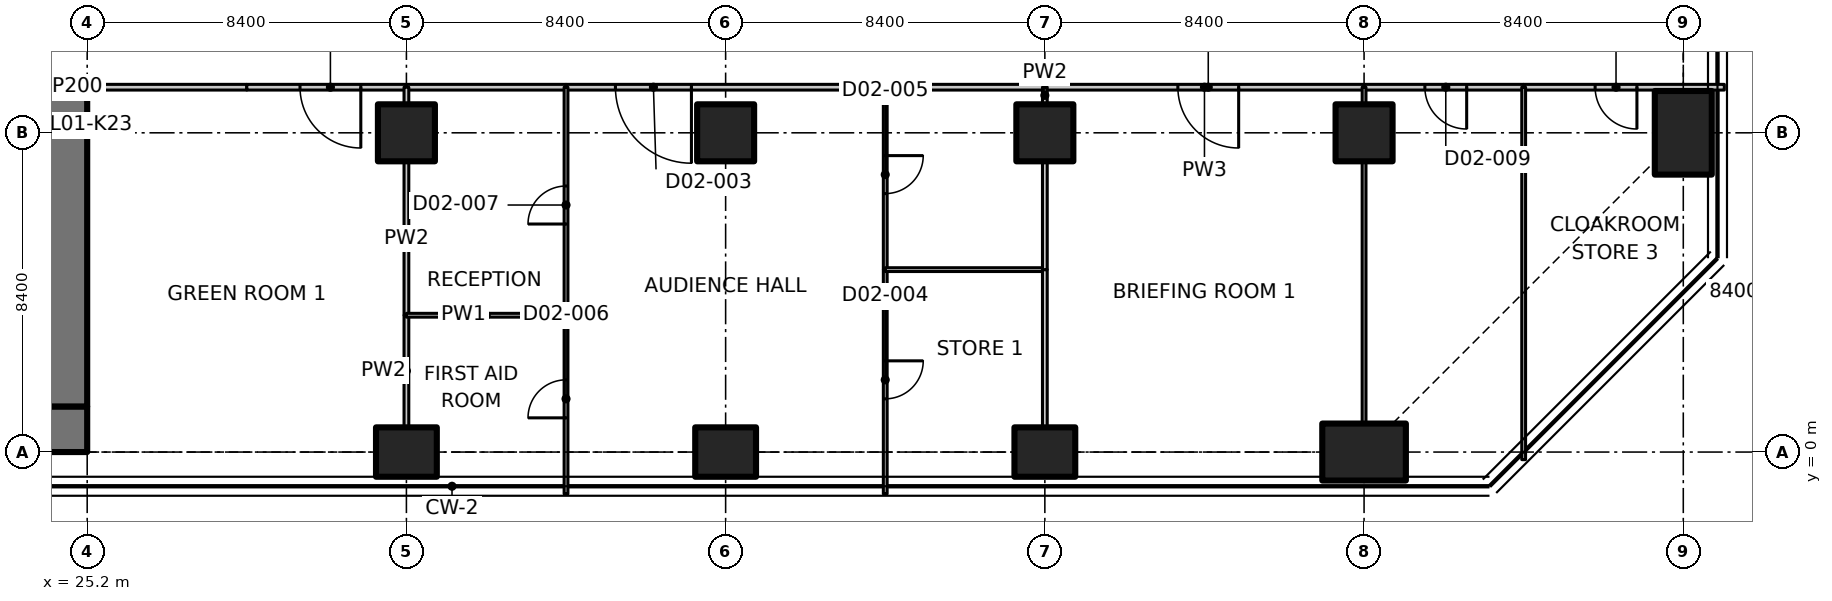
"""IFC4 building model, lengths in metres.
Left out: names, types, materials, properties, quantities, classifications, styles, units other than length and angle.
Written with IfcOpenShell. Run it as: python <this file> out.ifc"""

import sys

from ifc_helpers import new_model, si_unit, direction, frame, frame_2d, origin, origin_2d, place, context, subcontext, project, spatial, polyline, rectangle, outline, extrude, element, fill, save


model = new_model("IFC4")
c1 = context("Model", 3, precision=1e-05, world=origin(), true_north=direction((0.0, 1.0)))
c2 = subcontext(c1, "Body", "Model", "MODEL_VIEW")
j1 = project(units=[si_unit("LENGTHUNIT", "METRE"), si_unit("PLANEANGLEUNIT", "RADIAN")], contexts=[c1])
p1 = place(None, origin())
s1 = spatial("IfcSite", under=j1, at=p1, CompositionType="ELEMENT")
p2 = place(p1, origin())
s2 = spatial("IfcBuilding", under=s1, at=p2, CompositionType="ELEMENT")
p3 = place(p2, frame((0.0, 0.0, 7.0)))
s3 = spatial("IfcBuildingStorey", under=s2, at=p3, CompositionType="ELEMENT", Elevation=7.0)
p4 = place(p3, frame((33.6, 0.0, 0.0), z_axis=(0.0, 0.0, 1.0), x_axis=(0.0, 1.0, 0.0)))
e1 = element("IfcColumn", 1, at=p4, inside=s3, PredefinedType="COLUMN", context=c2, shape_type="SweptSolid", body=[
    extrude(rectangle(XDim=1.3, YDim=1.6, at=origin_2d()), origin(), (0.0, 0.0, 1.0), 5.25),
])
p5 = place(p3, frame((33.6, 8.4, 0.0), z_axis=(0.0, 0.0, 1.0), x_axis=(1.0, 0.0, 0.0)))
e2 = element("IfcColumn", 2, at=p5, inside=s3, PredefinedType="COLUMN", context=c2, shape_type="SweptSolid", body=[
    extrude(rectangle(XDim=1.5, YDim=1.5, at=origin_2d()), origin(), (0.0, 0.0, 1.0), 5.25),
])
p6 = place(p3, frame((42.0, 0.0, 0.0), z_axis=(0.0, 0.0, 1.0), x_axis=(0.0, 1.0, 0.0)))
e3 = element("IfcColumn", 3, at=p6, inside=s3, PredefinedType="COLUMN", context=c2, shape_type="SweptSolid", body=[
    extrude(rectangle(XDim=1.3, YDim=1.6, at=origin_2d()), origin(), (0.0, 0.0, 1.0), 5.25),
])
p7 = place(p3, frame((42.0, 8.4, 0.0), z_axis=(0.0, 0.0, 1.0), x_axis=(1.0, 0.0, 0.0)))
e4 = element("IfcColumn", 4, at=p7, inside=s3, PredefinedType="COLUMN", context=c2, shape_type="SweptSolid", body=[
    extrude(rectangle(XDim=1.5, YDim=1.5, at=origin_2d()), origin(), (0.0, 0.0, 1.0), 5.25),
])
p8 = place(p3, frame((50.4, 0.0, 0.0), z_axis=(0.0, 0.0, 1.0), x_axis=(0.0, 1.0, 0.0)))
e5 = element("IfcColumn", 5, at=p8, inside=s3, PredefinedType="COLUMN", context=c2, shape_type="SweptSolid", body=[
    extrude(rectangle(XDim=1.3, YDim=1.6, at=origin_2d()), origin(), (0.0, 0.0, 1.0), 5.25),
])
p9 = place(p3, frame((50.4, 8.4, 0.0), z_axis=(0.0, 0.0, 1.0), x_axis=(1.0, 0.0, 0.0)))
e6 = element("IfcColumn", 6, at=p9, inside=s3, PredefinedType="COLUMN", context=c2, shape_type="SweptSolid", body=[
    extrude(rectangle(XDim=1.5, YDim=1.5, at=origin_2d()), origin(), (0.0, 0.0, 1.0), 5.25),
])
p10 = place(p3, frame((58.8, 0.0, 0.0), z_axis=(0.0, 0.0, 1.0), x_axis=(0.0, 1.0, 0.0)))
e7 = element("IfcColumn", 7, at=p10, inside=s3, PredefinedType="COLUMN", context=c2, shape_type="SweptSolid", body=[
    extrude(rectangle(XDim=1.5, YDim=2.2, at=origin_2d()), origin(), (0.0, 0.0, 1.0), 5.25),
])
p11 = place(p3, frame((58.8, 8.4, 0.0), z_axis=(0.0, 0.0, 1.0), x_axis=(1.0, 0.0, 0.0)))
e8 = element("IfcColumn", 8, at=p11, inside=s3, PredefinedType="COLUMN", context=c2, shape_type="SweptSolid", body=[
    extrude(rectangle(XDim=1.5, YDim=1.5, at=origin_2d()), origin(), (0.0, 0.0, 1.0), 5.25),
])
p12 = place(p3, frame((67.2, 8.4, 0.0), z_axis=(0.0, 0.0, 1.0), x_axis=(1.0, 0.0, 0.0)))
e9 = element("IfcColumn", 9, at=p12, inside=s3, PredefinedType="COLUMN", context=c2, shape_type="SweptSolid", body=[
    extrude(rectangle(XDim=1.5, YDim=2.2, at=origin_2d()), origin(), (0.0, 0.0, 1.0), 5.25),
])
p13 = place(p3, frame((6.736, 0.6, 0.0), z_axis=(0.0, 0.0, 1.0), x_axis=(1.0, 0.0, 0.0)))
e10 = element("IfcWall", 10, at=p13, inside=s3, PredefinedType="SHEAR", context=c2, shape_type="SweptSolid", body=[
    extrude(rectangle(XDim=18.464, YDim=1.2, at=frame_2d((9.232, 0.0))), origin(), (0.0, 0.0, 1.0), 5.25),
])
p14 = place(p3, frame((24.6, 1.2, 0.0), z_axis=(0.0, 0.0, 1.0), x_axis=(0.0, 1.0, 0.0)))
e11 = element("IfcWall", 11, at=p14, inside=s3, PredefinedType="SHEAR", context=c2, shape_type="SweptSolid", body=[
    extrude(rectangle(XDim=8.6, YDim=1.2, at=frame_2d((4.3, 0.0))), origin(), (0.0, 0.0, 1.0), 5.25),
])
p15 = place(p3, frame((29.4, 9.6, 0.0), z_axis=(0.0, 0.0, 1.0), x_axis=(-1.0, 0.0, 0.0)))
e12 = element("IfcWall", 12, at=p15, inside=s3, PredefinedType="PARTITIONING", context=c2, shape_type="SweptSolid", body=[
    extrude(rectangle(XDim=4.2, YDim=0.15, at=frame_2d((2.1, 0.0))), origin(), (0.0, 0.0, 1.0), 5.23),
])
p16 = place(p3, frame((33.6, 9.6, 0.0), z_axis=(0.0, 0.0, 1.0), x_axis=(-1.0, 0.0, 0.0)))
e13 = element("IfcWall", 13, at=p16, inside=s3, PredefinedType="PARTITIONING", context=c2, shape_type="SweptSolid", body=[
    extrude(rectangle(XDim=4.2, YDim=0.15, at=frame_2d((2.1, 0.0))), origin(), (0.0, 0.0, 1.0), 5.23),
])
p17 = place(p16, frame((1.2, 0.0, 0.0)))
e14 = element("IfcOpeningElement", 14, at=p17, cuts=e13, PredefinedType="OPENING", context=c2, shape_type="SweptSolid", body=[
    extrude(rectangle(XDim=1.6, YDim=2.1, at=frame_2d((0.8, 1.05))), frame((0.0, 0.085, 0.0), z_axis=(0.0, -1.0, 0.0), x_axis=(1.0, 0.0, 0.0)), (0.0, 0.0, 1.0), 0.17),
])
p18 = place(p3, frame((46.2, 9.6, 0.0), z_axis=(0.0, 0.0, 1.0), x_axis=(-1.0, 0.0, 0.0)))
e15 = element("IfcWall", 15, at=p18, inside=s3, PredefinedType="PARTITIONING", context=c2, shape_type="SweptSolid", body=[
    extrude(rectangle(XDim=8.4, YDim=0.15, at=frame_2d((4.2, 0.0))), origin(), (0.0, 0.0, 1.0), 5.23),
])
p19 = place(p18, frame((5.1, 0.0, 0.0)))
e16 = element("IfcOpeningElement", 16, at=p19, cuts=e15, PredefinedType="OPENING", context=c2, shape_type="SweptSolid", body=[
    extrude(rectangle(XDim=2.0, YDim=2.4, at=frame_2d((1.0, 1.2))), frame((0.0, 0.085, 0.0), z_axis=(0.0, -1.0, 0.0), x_axis=(1.0, 0.0, 0.0)), (0.0, 0.0, 1.0), 0.17),
])
for number, where, z_axis, x_axis in (
    (17, (50.4, 9.6, 0.0), (0.0, 0.0, 1.0), (-1.0, 0.0, 0.0)),
    (18, (37.8, 9.6, 0.0), (0.0, 0.0, 1.0), (-1.0, 0.0, 0.0)),
):
    element("IfcWall", number, at=place(p3, frame(where, z_axis=z_axis, x_axis=x_axis)), inside=s3, PredefinedType="PARTITIONING", context=c2, shape_type="SweptSolid", body=[
        extrude(rectangle(XDim=4.2, YDim=0.15, at=frame_2d((2.1, 0.0))), origin(), (0.0, 0.0, 1.0), 5.23),
    ])
p20 = place(p3, frame((58.8, 9.6, 0.0), z_axis=(0.0, 0.0, 1.0), x_axis=(-1.0, 0.0, 0.0)))
e19 = element("IfcWall", 19, at=p20, inside=s3, PredefinedType="PARTITIONING", context=c2, shape_type="SweptSolid", body=[
    extrude(rectangle(XDim=8.4, YDim=0.15, at=frame_2d((4.2, 0.0))), origin(), (0.0, 0.0, 1.0), 5.23),
])
p21 = place(p20, frame((3.3, 0.0, 0.0)))
e20 = element("IfcOpeningElement", 20, at=p21, cuts=e19, PredefinedType="OPENING", context=c2, shape_type="SweptSolid", body=[
    extrude(rectangle(XDim=1.6, YDim=2.1, at=frame_2d((0.8, 1.05))), frame((0.0, 0.085, 0.0), z_axis=(0.0, -1.0, 0.0), x_axis=(1.0, 0.0, 0.0)), (0.0, 0.0, 1.0), 0.17),
])
p22 = place(p3, frame((63.0, 9.6, 0.0), z_axis=(0.0, 0.0, 1.0), x_axis=(-1.0, 0.0, 0.0)))
e21 = element("IfcWall", 21, at=p22, inside=s3, PredefinedType="PARTITIONING", context=c2, shape_type="SweptSolid", body=[
    extrude(rectangle(XDim=4.2, YDim=0.15, at=frame_2d((2.1, 0.0))), origin(), (0.0, 0.0, 1.0), 5.23),
])
p23 = place(p22, frame((1.5, 0.0, 0.0)))
e22 = element("IfcOpeningElement", 22, at=p23, cuts=e21, PredefinedType="OPENING", context=c2, shape_type="SweptSolid", body=[
    extrude(rectangle(XDim=1.1, YDim=2.1, at=frame_2d((0.55, 1.05))), frame((0.0, 0.085, 0.0), z_axis=(0.0, -1.0, 0.0), x_axis=(1.0, 0.0, 0.0)), (0.0, 0.0, 1.0), 0.17),
])
p24 = place(p3, frame((68.28, 9.6, 0.0), z_axis=(0.0, 0.0, 1.0), x_axis=(-1.0, 0.0, 0.0)))
e23 = element("IfcWall", 23, at=p24, inside=s3, PredefinedType="PARTITIONING", context=c2, shape_type="SweptSolid", body=[
    extrude(outline(polyline([(0.0, 0.0), (5.28, 0.0), (5.28, 5.23), (1.53, 5.23), (1.528, 4.88), (0.632, 4.88), (0.63, 5.23), (0.0, 5.23), (0.0, 0.0)])), frame((0.0, 0.075, 0.0), z_axis=(0.0, -1.0, 0.0), x_axis=(1.0, 0.0, 0.0)), (0.0, 0.0, 1.0), 0.15),
])
p25 = place(p24, frame((2.3, 0.0, 0.0)))
e24 = element("IfcOpeningElement", 24, at=p25, cuts=e23, PredefinedType="OPENING", context=c2, shape_type="SweptSolid", body=[
    extrude(rectangle(XDim=1.1, YDim=2.1, at=frame_2d((0.55, 1.05))), frame((0.0, 0.085, 0.0), z_axis=(0.0, -1.0, 0.0), x_axis=(1.0, 0.0, 0.0)), (0.0, 0.0, 1.0), 0.17),
])
p26 = place(p3, frame((33.6, 3.6, 0.0), z_axis=(0.0, 0.0, 1.0), x_axis=(0.0, -1.0, 0.0)))
e25 = element("IfcWall", 25, at=p26, inside=s3, PredefinedType="PARTITIONING", context=c2, shape_type="SweptSolid", body=[
    extrude(rectangle(XDim=2.93, YDim=0.125, at=frame_2d((1.465, 0.0))), origin(), (0.0, 0.0, 1.0), 5.23),
])
p27 = place(p3, frame((33.6, 9.6, 0.0), z_axis=(0.0, 0.0, 1.0), x_axis=(0.0, -1.0, 0.0)))
e26 = element("IfcWall", 26, at=p27, inside=s3, PredefinedType="PARTITIONING", context=c2, shape_type="SweptSolid", body=[
    extrude(rectangle(XDim=0.43, YDim=0.125, at=frame_2d((0.215, 0.0))), origin(), (0.0, 0.0, 1.0), 5.23),
])
p28 = place(p3, frame((33.6, 7.63, 0.0), z_axis=(0.0, 0.0, 1.0), x_axis=(0.0, -1.0, 0.0)))
e27 = element("IfcWall", 27, at=p28, inside=s3, PredefinedType="PARTITIONING", context=c2, shape_type="SweptSolid", body=[
    extrude(rectangle(XDim=4.03, YDim=0.125, at=frame_2d((2.015, 0.0))), origin(), (0.0, 0.0, 1.0), 5.23),
])
p29 = place(p3, frame((46.2, 4.8, 0.0), z_axis=(0.0, 0.0, 1.0), x_axis=(0.0, -1.0, 0.0)))
e28 = element("IfcWall", 28, at=p29, inside=s3, PredefinedType="PARTITIONING", context=c2, shape_type="SweptSolid", body=[
    extrude(outline(polyline([(0.0, 0.0), (5.9, 0.0), (5.9, 5.23), (5.25, 5.23), (5.248, 4.88), (4.352, 4.88), (4.35, 5.23), (0.0, 5.23), (0.0, 0.0)])), frame((0.0, 0.05, 0.0), z_axis=(0.0, -1.0, 0.0), x_axis=(1.0, 0.0, 0.0)), (0.0, 0.0, 1.0), 0.1),
])
p30 = place(p29, frame((2.4, 0.0, 0.0)))
e29 = element("IfcOpeningElement", 29, at=p30, cuts=e28, PredefinedType="OPENING", context=c2, shape_type="SweptSolid", body=[
    extrude(rectangle(XDim=1.0, YDim=2.1, at=frame_2d((0.5, 1.05))), frame((0.0, 0.06, 0.0), z_axis=(0.0, -1.0, 0.0), x_axis=(1.0, 0.0, 0.0)), (0.0, 0.0, 1.0), 0.12),
])
p31 = place(p3, frame((46.2, 9.6, 0.0), z_axis=(0.0, 0.0, 1.0), x_axis=(0.0, -1.0, 0.0)))
e30 = element("IfcWall", 30, at=p31, inside=s3, PredefinedType="PARTITIONING", context=c2, shape_type="SweptSolid", body=[
    extrude(rectangle(XDim=4.8, YDim=0.1, at=frame_2d((2.4, 0.0))), origin(), (0.0, 0.0, 1.0), 5.23),
])
p32 = place(p31, frame((1.8, 0.0, 0.0)))
e31 = element("IfcOpeningElement", 31, at=p32, cuts=e30, PredefinedType="OPENING", context=c2, shape_type="SweptSolid", body=[
    extrude(rectangle(XDim=1.0, YDim=2.1, at=frame_2d((0.5, 1.05))), frame((0.0, 0.06, 0.0), z_axis=(0.0, -1.0, 0.0), x_axis=(1.0, 0.0, 0.0)), (0.0, 0.0, 1.0), 0.12),
])
p33 = place(p3, frame((37.8, -1.1, 0.0), z_axis=(0.0, 0.0, 1.0), x_axis=(0.0, 1.0, 0.0)))
e32 = element("IfcWall", 32, at=p33, inside=s3, PredefinedType="PARTITIONING", context=c2, shape_type="SweptSolid", body=[
    extrude(outline(polyline([(0.0, 0.0), (4.7, 0.0), (4.7, 5.23), (1.55, 5.23), (1.548, 4.88), (0.652, 4.88), (0.65, 5.23), (0.0, 5.23), (0.0, 0.0)])), frame((0.0, 0.05, 0.0), z_axis=(0.0, -1.0, 0.0), x_axis=(1.0, 0.0, 0.0)), (0.0, 0.0, 1.0), 0.1),
])
p34 = place(p33, frame((2.0, 0.0, 0.0)))
e33 = element("IfcOpeningElement", 33, at=p34, cuts=e32, PredefinedType="OPENING", context=c2, shape_type="SweptSolid", body=[
    extrude(rectangle(XDim=1.0, YDim=2.1, at=frame_2d((0.5, 1.05))), frame((0.0, 0.06, 0.0), z_axis=(0.0, -1.0, 0.0), x_axis=(1.0, 0.0, 0.0)), (0.0, 0.0, 1.0), 0.12),
])
p35 = place(p3, frame((37.8, 3.6, 0.0), z_axis=(0.0, 0.0, 1.0), x_axis=(0.0, 1.0, 0.0)))
e34 = element("IfcWall", 34, at=p35, inside=s3, PredefinedType="PARTITIONING", context=c2, shape_type="SweptSolid", body=[
    extrude(rectangle(XDim=6.0, YDim=0.1, at=frame_2d((3.0, 0.0))), origin(), (0.0, 0.0, 1.0), 5.23),
])
p36 = place(p35, frame((2.4, 0.0, 0.0)))
e35 = element("IfcOpeningElement", 35, at=p36, cuts=e34, PredefinedType="OPENING", context=c2, shape_type="SweptSolid", body=[
    extrude(rectangle(XDim=1.0, YDim=2.1, at=frame_2d((0.5, 1.05))), frame((0.0, 0.06, 0.0), z_axis=(0.0, -1.0, 0.0), x_axis=(1.0, 0.0, 0.0)), (0.0, 0.0, 1.0), 0.12),
])
p37 = place(p3, frame((46.2, 4.8, 0.0), z_axis=(0.0, 0.0, 1.0), x_axis=(1.0, 0.0, 0.0)))
e36 = element("IfcWall", 36, at=p37, inside=s3, PredefinedType="PARTITIONING", context=c2, shape_type="SweptSolid", body=[
    extrude(rectangle(XDim=4.2, YDim=0.1, at=frame_2d((2.1, 0.0))), origin(), (0.0, 0.0, 1.0), 5.23),
])
p38 = place(p3, frame((50.4, 4.8, 0.0), z_axis=(0.0, 0.0, 1.0), x_axis=(0.0, -1.0, 0.0)))
e37 = element("IfcWall", 37, at=p38, inside=s3, PredefinedType="PARTITIONING", context=c2, shape_type="SweptSolid", body=[
    extrude(rectangle(XDim=4.13, YDim=0.125, at=frame_2d((2.065, 0.0))), origin(), (0.0, 0.0, 1.0), 5.23),
])
p39 = place(p3, frame((50.4, 9.6, 0.0), z_axis=(0.0, 0.0, 1.0), x_axis=(0.0, -1.0, 0.0)))
e38 = element("IfcWall", 38, at=p39, inside=s3, PredefinedType="PARTITIONING", context=c2, shape_type="SweptSolid", body=[
    extrude(rectangle(XDim=0.43, YDim=0.125, at=frame_2d((0.215, 0.0))), origin(), (0.0, 0.0, 1.0), 5.23),
])
p40 = place(p3, frame((50.4, 7.63, 0.0), z_axis=(0.0, 0.0, 1.0), x_axis=(0.0, -1.0, 0.0)))
e39 = element("IfcWall", 39, at=p40, inside=s3, PredefinedType="PARTITIONING", context=c2, shape_type="SweptSolid", body=[
    extrude(rectangle(XDim=2.83, YDim=0.125, at=frame_2d((1.415, 0.0))), origin(), (0.0, 0.0, 1.0), 5.23),
])
p41 = place(p3, frame((33.6, 3.6, 0.0), z_axis=(0.0, 0.0, 1.0), x_axis=(1.0, 0.0, 0.0)))
e40 = element("IfcWall", 40, at=p41, inside=s3, PredefinedType="PARTITIONING", context=c2, shape_type="SweptSolid", body=[
    extrude(rectangle(XDim=4.2, YDim=0.1, at=frame_2d((2.1, 0.0))), origin(), (0.0, 0.0, 1.0), 5.23),
])
p42 = place(p3, frame((58.8, 9.6, 0.0), z_axis=(0.0, 0.0, 1.0), x_axis=(0.0, -1.0, 0.0)))
e41 = element("IfcWall", 41, at=p42, inside=s3, PredefinedType="PARTITIONING", context=c2, shape_type="SweptSolid", body=[
    extrude(rectangle(XDim=0.43, YDim=0.1, at=frame_2d((0.215, 0.0))), origin(), (0.0, 0.0, 1.0), 5.23),
])
p43 = place(p3, frame((58.8, 7.63, 0.0), z_axis=(0.0, 0.0, 1.0), x_axis=(0.0, -1.0, 0.0)))
e42 = element("IfcWall", 42, at=p43, inside=s3, PredefinedType="PARTITIONING", context=c2, shape_type="SweptSolid", body=[
    extrude(rectangle(XDim=6.86, YDim=0.1, at=frame_2d((3.43, 0.0))), origin(), (0.0, 0.0, 1.0), 5.23),
])
p44 = place(p3, frame((63.0, 9.6, 0.0), z_axis=(0.0, 0.0, 1.0), x_axis=(0.0, -1.0, 0.0)))
e43 = element("IfcWall", 43, at=p44, inside=s3, PredefinedType="PARTITIONING", context=c2, shape_type="SweptSolid", body=[
    extrude(outline(polyline([(0.0, 0.0), (9.8, 0.0), (9.8, 5.23), (6.066, 5.23), (6.064, 4.88), (4.736, 4.88), (4.734, 5.23), (0.0, 5.23), (0.0, 0.0)])), frame((0.0, 0.05, 0.0), z_axis=(0.0, -1.0, 0.0), x_axis=(1.0, 0.0, 0.0)), (0.0, 0.0, 1.0), 0.1),
])
p45 = place(p17, origin())
e44 = element("IfcDoor", 44, at=p45, inside=s3, OperationType="DOUBLE_DOOR_SINGLE_SWING", PredefinedType="DOOR", context=c2, shape_type="SweptSolid", body=[
    extrude(rectangle(XDim=1.6, YDim=2.1, at=frame_2d((0.8, 1.05))), frame((0.0, 0.025, 0.0), z_axis=(0.0, -1.0, 0.0), x_axis=(1.0, 0.0, 0.0)), (0.0, 0.0, 1.0), 0.05),
])
fill(e14, e44)
p46 = place(p19, origin())
e45 = element("IfcDoor", 45, at=p46, inside=s3, OperationType="DOUBLE_DOOR_SINGLE_SWING", PredefinedType="DOOR", context=c2, shape_type="SweptSolid", body=[
    extrude(rectangle(XDim=2.0, YDim=2.4, at=frame_2d((1.0, 1.2))), frame((0.0, 0.025, 0.0), z_axis=(0.0, -1.0, 0.0), x_axis=(1.0, 0.0, 0.0)), (0.0, 0.0, 1.0), 0.05),
])
fill(e16, e45)
p47 = place(p30, origin())
e46 = element("IfcDoor", 46, at=p47, inside=s3, OperationType="SINGLE_SWING_LEFT", PredefinedType="DOOR", context=c2, shape_type="SweptSolid", body=[
    extrude(rectangle(XDim=1.0, YDim=2.1, at=frame_2d((0.5, 1.05))), frame((0.0, 0.025, 0.0), z_axis=(0.0, -1.0, 0.0), x_axis=(1.0, 0.0, 0.0)), (0.0, 0.0, 1.0), 0.05),
])
fill(e29, e46)
p48 = place(p32, origin())
e47 = element("IfcDoor", 47, at=p48, inside=s3, OperationType="SINGLE_SWING_LEFT", PredefinedType="DOOR", context=c2, shape_type="SweptSolid", body=[
    extrude(rectangle(XDim=1.0, YDim=2.1, at=frame_2d((0.5, 1.05))), frame((0.0, 0.025, 0.0), z_axis=(0.0, -1.0, 0.0), x_axis=(1.0, 0.0, 0.0)), (0.0, 0.0, 1.0), 0.05),
])
fill(e31, e47)
p49 = place(p34, origin())
e48 = element("IfcDoor", 48, at=p49, inside=s3, OperationType="SINGLE_SWING_LEFT", PredefinedType="DOOR", context=c2, shape_type="SweptSolid", body=[
    extrude(rectangle(XDim=1.0, YDim=2.1, at=frame_2d((0.5, 1.05))), frame((0.0, 0.025, 0.0), z_axis=(0.0, -1.0, 0.0), x_axis=(1.0, 0.0, 0.0)), (0.0, 0.0, 1.0), 0.05),
])
fill(e33, e48)
p50 = place(p36, origin())
e49 = element("IfcDoor", 49, at=p50, inside=s3, OperationType="SINGLE_SWING_LEFT", PredefinedType="DOOR", context=c2, shape_type="SweptSolid", body=[
    extrude(rectangle(XDim=1.0, YDim=2.1, at=frame_2d((0.5, 1.05))), frame((0.0, 0.025, 0.0), z_axis=(0.0, -1.0, 0.0), x_axis=(1.0, 0.0, 0.0)), (0.0, 0.0, 1.0), 0.05),
])
fill(e35, e49)
p51 = place(p21, origin())
e50 = element("IfcDoor", 50, at=p51, inside=s3, OperationType="DOUBLE_DOOR_SINGLE_SWING", PredefinedType="DOOR", context=c2, shape_type="SweptSolid", body=[
    extrude(rectangle(XDim=1.6, YDim=2.1, at=frame_2d((0.8, 1.05))), frame((0.0, 0.025, 0.0), z_axis=(0.0, -1.0, 0.0), x_axis=(1.0, 0.0, 0.0)), (0.0, 0.0, 1.0), 0.05),
])
fill(e20, e50)
p52 = place(p23, origin())
e51 = element("IfcDoor", 51, at=p52, inside=s3, OperationType="SINGLE_SWING_LEFT", PredefinedType="DOOR", context=c2, shape_type="SweptSolid", body=[
    extrude(rectangle(XDim=1.1, YDim=2.1, at=frame_2d((0.55, 1.05))), frame((0.0, 0.025, 0.0), z_axis=(0.0, -1.0, 0.0), x_axis=(1.0, 0.0, 0.0)), (0.0, 0.0, 1.0), 0.05),
])
fill(e22, e51)
p53 = place(p25, origin())
e52 = element("IfcDoor", 52, at=p53, inside=s3, OperationType="SINGLE_SWING_LEFT", PredefinedType="DOOR", context=c2, shape_type="SweptSolid", body=[
    extrude(rectangle(XDim=1.1, YDim=2.1, at=frame_2d((0.55, 1.05))), frame((0.0, 0.025, 0.0), z_axis=(0.0, -1.0, 0.0), x_axis=(1.0, 0.0, 0.0)), (0.0, 0.0, 1.0), 0.05),
])
fill(e24, e52)
save(model, sys.argv[1])
